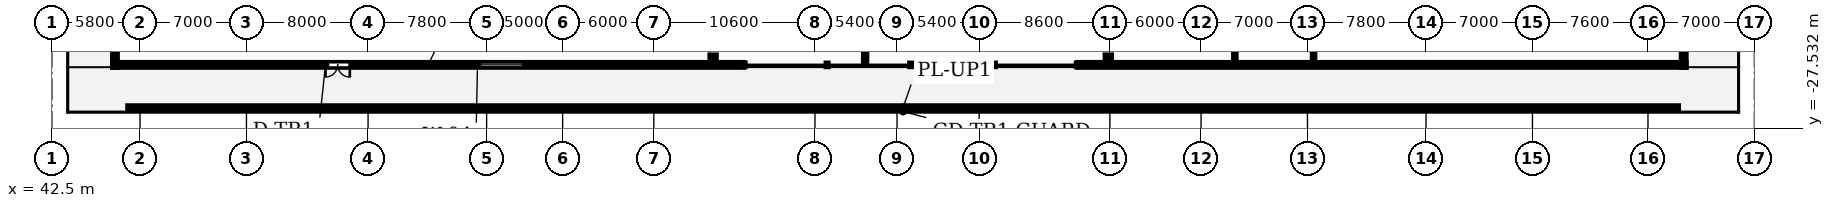
"""IFC4 building model, lengths in metres.
Left out: names, types, materials, properties, quantities, classifications, styles, units other than length and angle.
Written with IfcOpenShell. Run it as: python <this file> out.ifc"""

import sys

from ifc_helpers import new_model, si_unit, direction, frame, frame_2d, origin, origin_2d, place, context, subcontext, project, spatial, rectangle, i_section, extrude, element, fill, save


model = new_model("IFC4")
c1 = context("Model", 3, precision=1e-05, world=origin(), true_north=direction((0.0, 1.0)))
c2 = subcontext(c1, "Body", "Model", "MODEL_VIEW")
j1 = project(units=[si_unit("LENGTHUNIT", "METRE"), si_unit("PLANEANGLEUNIT", "RADIAN")], contexts=[c1])
p1 = place(None, origin())
s1 = spatial("IfcSite", under=j1, at=p1, CompositionType="ELEMENT")
p2 = place(p1, origin())
s2 = spatial("IfcBuilding", under=s1, at=p2, CompositionType="ELEMENT")
p3 = place(p2, frame((0.0, 0.0, 5.4)))
s3 = spatial("IfcBuildingStorey", under=s2, at=p3, CompositionType="ELEMENT", Elevation=5.4)
for number, where, z_axis, x_axis in (
    (1, (86.0, -22.9, 0.0), (0.0, 0.0, 1.0), (1.0, 0.0, 0.0)),
    (2, (112.0, -22.9, 0.0), (0.0, 0.0, 1.0), (1.0, 0.0, 0.0)),
):
    element("IfcColumn", number, at=place(p3, frame(where, z_axis=z_axis, x_axis=x_axis)), inside=s3, PredefinedType="COLUMN", context=c2, shape_type="SweptSolid", body=[
        extrude(i_section(OverallWidth=0.399, OverallDepth=0.394, WebThickness=0.023, FlangeThickness=0.037, FilletRadius=0.015, at=origin_2d()), origin(), (0.0, 0.0, 1.0), 4.36),
    ])
p4 = place(p3, frame((46.5, -23.35, 0.0), z_axis=(0.0, 0.0, 1.0), x_axis=(1.0, 0.0, 0.0)))
e3 = element("IfcWall", 3, at=p4, inside=s3, PredefinedType="STANDARD", context=c2, shape_type="SweptSolid", body=[
    extrude(rectangle(XDim=41.5, YDim=0.3, at=frame_2d((20.75, 0.0))), origin(), (0.0, 0.0, 1.0), 4.3),
])
p5 = place(p4, frame((14.0, 0.0, 0.0)))
e4 = element("IfcOpeningElement", 4, at=p5, cuts=e3, PredefinedType="OPENING", context=c2, shape_type="SweptSolid", body=[
    extrude(rectangle(XDim=1.6, YDim=2.2, at=frame_2d((0.8, 1.1))), frame((0.0, 0.16, 0.0), z_axis=(0.0, -1.0, 0.0), x_axis=(1.0, 0.0, 0.0)), (0.0, 0.0, 1.0), 0.32),
])
p6 = place(p4, frame((24.0, 0.0, 0.9)))
e5 = element("IfcOpeningElement", 5, at=p6, cuts=e3, PredefinedType="OPENING", context=c2, shape_type="SweptSolid", body=[
    extrude(rectangle(XDim=3.0, YDim=2.6, at=frame_2d((1.5, 1.3))), frame((0.0, 0.16, 0.0), z_axis=(0.0, -1.0, 0.0), x_axis=(1.0, 0.0, 0.0)), (0.0, 0.0, 1.0), 0.32),
])
p7 = place(p3, frame((110.0, -23.35, 0.0), z_axis=(0.0, 0.0, 1.0), x_axis=(1.0, 0.0, 0.0)))
e6 = element("IfcWall", 6, at=p7, inside=s3, PredefinedType="STANDARD", context=c2, shape_type="SweptSolid", body=[
    extrude(rectangle(XDim=40.0, YDim=0.3, at=frame_2d((20.0, 0.0))), origin(), (0.0, 0.0, 1.0), 4.3),
])
p8 = place(p3, frame((46.65, 106.7, 0.0), z_axis=(0.0, 0.0, 1.0), x_axis=(0.0, -1.0, 0.0)))
e7 = element("IfcWall", 7, at=p8, inside=s3, PredefinedType="STANDARD", context=c2, shape_type="SweptSolid", body=[
    extrude(rectangle(XDim=130.2, YDim=0.3, at=frame_2d((65.1, 0.0))), origin(), (0.0, 0.0, 1.0), 4.3),
])
p9 = place(p8, frame((12.0, 0.0, 0.0)))
e8 = element("IfcOpeningElement", 8, at=p9, cuts=e7, PredefinedType="OPENING", context=c2, shape_type="SweptSolid", body=[
    extrude(rectangle(XDim=1.6, YDim=2.2, at=frame_2d((0.8, 1.1))), frame((0.0, 0.16, 0.0), z_axis=(0.0, -1.0, 0.0), x_axis=(1.0, 0.0, 0.0)), (0.0, 0.0, 1.0), 0.32),
])
p10 = place(p3, frame((149.85, -23.5, 0.0), z_axis=(0.0, 0.0, 1.0), x_axis=(0.0, 1.0, 0.0)))
e9 = element("IfcWall", 9, at=p10, inside=s3, PredefinedType="STANDARD", context=c2, shape_type="SweptSolid", body=[
    extrude(rectangle(XDim=130.2, YDim=0.3, at=frame_2d((65.1, 0.0))), origin(), (0.0, 0.0, 1.0), 4.3),
])
p11 = place(p10, frame((20.0, 0.0, 0.0)))
e10 = element("IfcOpeningElement", 10, at=p11, cuts=e9, PredefinedType="OPENING", context=c2, shape_type="SweptSolid", body=[
    extrude(rectangle(XDim=1.6, YDim=2.2, at=frame_2d((0.8, 1.1))), frame((0.0, 0.16, 0.0), z_axis=(0.0, -1.0, 0.0), x_axis=(1.0, 0.0, 0.0)), (0.0, 0.0, 1.0), 0.32),
])
p12 = place(p3, frame((47.5, -26.15, 0.0), z_axis=(0.0, 0.0, 1.0), x_axis=(1.0, 0.0, 0.0)))
e11 = element("IfcWall", 11, at=p12, inside=s3, PredefinedType="PARAPET", context=c2, shape_type="SweptSolid", body=[
    extrude(rectangle(XDim=102.0, YDim=0.2, at=frame_2d((51.0, 0.0))), origin(), (0.0, 0.0, 1.0), 0.65),
])
p13 = place(p3, frame((96.0, -23.2, 0.0), z_axis=(0.0, 0.0, 1.0), x_axis=(0.0, 1.0, 0.0)))
e12 = element("IfcWall", 12, at=p13, inside=s3, PredefinedType="PARTITIONING", context=c2, shape_type="SweptSolid", body=[
    extrude(rectangle(XDim=41.45, YDim=0.2, at=frame_2d((20.725, 0.0))), origin(), (0.0, 0.0, 1.0), 4.3),
])
p14 = place(p13, frame((9.5, 0.0, 0.0)))
e13 = element("IfcOpeningElement", 13, at=p14, cuts=e12, PredefinedType="OPENING", context=c2, shape_type="SweptSolid", body=[
    extrude(rectangle(XDim=1.22, YDim=2.18, at=frame_2d((0.61, 1.09))), frame((0.0, 0.11, 0.0), z_axis=(0.0, -1.0, 0.0), x_axis=(1.0, 0.0, 0.0)), (0.0, 0.0, 1.0), 0.22),
])
p15 = place(p3, frame((120.32, -23.2, 0.0), z_axis=(0.0, 0.0, 1.0), x_axis=(0.0, 1.0, 0.0)))
e14 = element("IfcWall", 14, at=p15, inside=s3, PredefinedType="PARTITIONING", context=c2, shape_type="SweptSolid", body=[
    extrude(rectangle(XDim=10.0, YDim=0.15, at=frame_2d((5.0, 0.0))), origin(), (0.0, 0.0, 1.0), 4.3),
])
p16 = place(p15, frame((1.8, 0.0, 0.0)))
e15 = element("IfcOpeningElement", 15, at=p16, cuts=e14, PredefinedType="OPENING", context=c2, shape_type="SweptSolid", body=[
    extrude(rectangle(XDim=0.96, YDim=2.1, at=frame_2d((0.48, 1.05))), frame((0.0, 0.085, 0.0), z_axis=(0.0, -1.0, 0.0), x_axis=(1.0, 0.0, 0.0)), (0.0, 0.0, 1.0), 0.17),
])
p17 = place(p15, frame((6.6, 0.0, 0.0)))
e16 = element("IfcOpeningElement", 16, at=p17, cuts=e14, PredefinedType="OPENING", context=c2, shape_type="SweptSolid", body=[
    extrude(rectangle(XDim=0.92, YDim=2.08, at=frame_2d((0.46, 1.04))), frame((0.0, 0.085, 0.0), z_axis=(0.0, -1.0, 0.0), x_axis=(1.0, 0.0, 0.0)), (0.0, 0.0, 1.0), 0.17),
])
p18 = place(p3, frame((125.5, -23.2, 0.0), z_axis=(0.0, 0.0, 1.0), x_axis=(0.0, 1.0, 0.0)))
e17 = element("IfcWall", 17, at=p18, inside=s3, PredefinedType="PARTITIONING", context=c2, shape_type="SweptSolid", body=[
    extrude(rectangle(XDim=10.0, YDim=0.15, at=frame_2d((5.0, 0.0))), origin(), (0.0, 0.0, 1.0), 4.3),
])
p19 = place(p5, frame((1.6, 0.0, 0.0), z_axis=(0.0, 0.0, 1.0), x_axis=(-1.0, 0.0, 0.0)))
e18 = element("IfcDoor", 18, at=p19, inside=s3, OperationType="DOUBLE_DOOR_SINGLE_SWING", PredefinedType="DOOR", context=c2, shape_type="SweptSolid", body=[
    extrude(rectangle(XDim=1.6, YDim=2.2, at=frame_2d((0.8, 1.1))), frame((0.0, 0.025, 0.0), z_axis=(0.0, -1.0, 0.0), x_axis=(1.0, 0.0, 0.0)), (0.0, 0.0, 1.0), 0.05),
])
fill(e4, e18)
p20 = place(p6, origin())
e19 = element("IfcWindow", 19, at=p20, inside=s3, PartitioningType="TRIPLE_PANEL_VERTICAL", PredefinedType="WINDOW", context=c2, shape_type="SweptSolid", body=[
    extrude(rectangle(XDim=3.0, YDim=2.6, at=frame_2d((1.5, 1.3))), frame((0.0, 0.03, 0.0), z_axis=(0.0, -1.0, 0.0), x_axis=(1.0, 0.0, 0.0)), (0.0, 0.0, 1.0), 0.06),
])
fill(e5, e19)
save(model, sys.argv[1])
